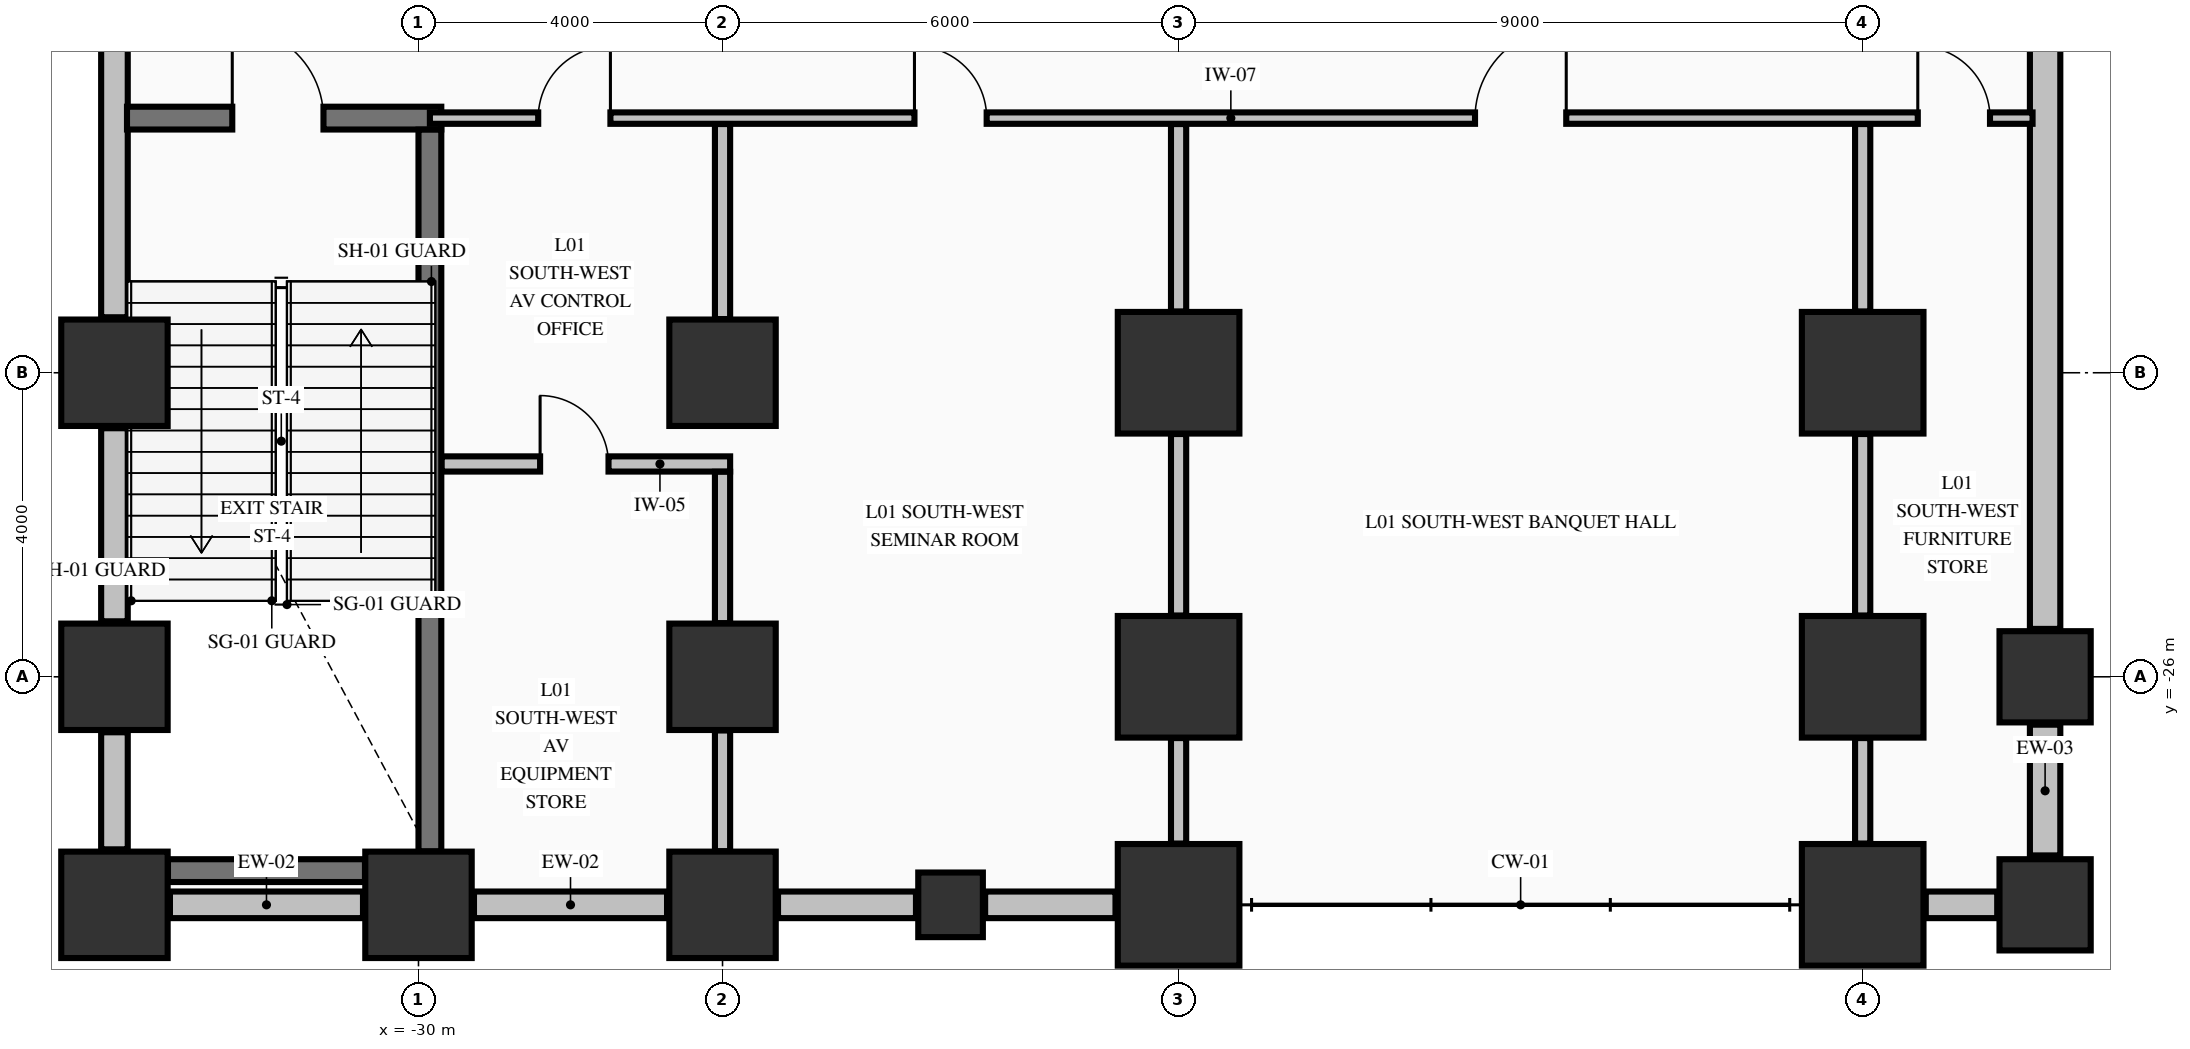
"""IFC4 building model, lengths in metres.
Left out: names, types, materials, properties, quantities, classifications, styles, units other than length and angle.
Written with IfcOpenShell. Run it as: python <this file> out.ifc"""

import sys

from ifc_helpers import new_model, si_unit, direction, frame, frame_2d, origin, origin_2d, place, context, subcontext, project, spatial, rectangle, extrude, element, fill, save


model = new_model("IFC4")
c1 = context("Model", 3, precision=1e-05, world=origin(), true_north=direction((0.0, 1.0)))
c2 = subcontext(c1, "Body", "Model", "MODEL_VIEW")
j1 = project(units=[si_unit("LENGTHUNIT", "METRE"), si_unit("PLANEANGLEUNIT", "RADIAN")], contexts=[c1])
p1 = place(None, origin())
s1 = spatial("IfcSite", under=j1, at=p1, CompositionType="ELEMENT")
p2 = place(p1, origin())
s2 = spatial("IfcBuilding", under=s1, at=p2, CompositionType="ELEMENT")
p3 = place(p2, frame((0.0, 0.0, 5.44)))
s3 = spatial("IfcBuildingStorey", under=s2, at=p3, CompositionType="ELEMENT", Elevation=5.44)
for number, where, z_axis, x_axis in (
    (1, (-34.0, -29.0, 0.0), (0.0, 0.0, 1.0), (1.0, 0.0, 0.0)),
    (2, (-34.0, -26.0, 0.0), (0.0, 0.0, 1.0), (1.0, 0.0, 0.0)),
    (3, (-34.0, -22.0, 0.0), (0.0, 0.0, 1.0), (1.0, 0.0, 0.0)),
    (4, (-30.0, -29.0, 0.0), (0.0, 0.0, 1.0), (1.0, 0.0, 0.0)),
    (5, (-26.0, -29.0, 0.0), (0.0, 0.0, 1.0), (1.0, 0.0, 0.0)),
    (6, (-26.0, -26.0, 0.0), (0.0, 0.0, 1.0), (1.0, 0.0, 0.0)),
    (7, (-26.0, -22.0, 0.0), (0.0, 0.0, 1.0), (1.0, 0.0, 0.0)),
):
    element("IfcColumn", number, at=place(p3, frame(where, z_axis=z_axis, x_axis=x_axis)), inside=s3, PredefinedType="COLUMN", context=c2, shape_type="SweptSolid", body=[
        extrude(rectangle(XDim=1.4, YDim=1.4, at=origin_2d()), origin(), (0.0, 0.0, 1.0), 5.09),
    ])
for number, where, z_axis, x_axis in (
    (8, (-20.0, -29.0, 0.0), (0.0, 0.0, 1.0), (1.0, 0.0, 0.0)),
    (9, (-20.0, -26.0, 0.0), (0.0, 0.0, 1.0), (1.0, 0.0, 0.0)),
    (10, (-20.0, -22.0, 0.0), (0.0, 0.0, 1.0), (1.0, 0.0, 0.0)),
    (11, (-11.0, -29.0, 0.0), (0.0, 0.0, 1.0), (1.0, 0.0, 0.0)),
    (12, (-11.0, -26.0, 0.0), (0.0, 0.0, 1.0), (1.0, 0.0, 0.0)),
    (13, (-11.0, -22.0, 0.0), (0.0, 0.0, 1.0), (1.0, 0.0, 0.0)),
):
    element("IfcColumn", number, at=place(p3, frame(where, z_axis=z_axis, x_axis=x_axis)), inside=s3, PredefinedType="COLUMN", context=c2, shape_type="SweptSolid", body=[
        extrude(rectangle(XDim=1.6, YDim=1.6, at=origin_2d()), origin(), (0.0, 0.0, 1.0), 5.09),
    ])
for number, where, z_axis, x_axis in (
    (14, (-8.6, -29.0, 0.0), (0.0, 0.0, 1.0), (1.0, 0.0, 0.0)),
    (15, (-8.6, -26.0, 0.0), (0.0, 0.0, 1.0), (1.0, 0.0, 0.0)),
):
    element("IfcColumn", number, at=place(p3, frame(where, z_axis=z_axis, x_axis=x_axis)), inside=s3, PredefinedType="COLUMN", context=c2, shape_type="SweptSolid", body=[
        extrude(rectangle(XDim=1.2, YDim=1.2, at=origin_2d()), origin(), (0.0, 0.0, 1.0), 5.09),
    ])
p4 = place(p3, frame((-23.0, -29.0, 0.0), z_axis=(0.0, 0.0, 1.0), x_axis=(1.0, 0.0, 0.0)))
e16 = element("IfcColumn", 16, at=p4, inside=s3, PredefinedType="PILASTER", context=c2, shape_type="SweptSolid", body=[
    extrude(rectangle(XDim=0.85, YDim=0.85, at=origin_2d()), origin(), (0.0, 0.0, 1.0), 5.09),
])
for number, where, z_axis, x_axis in (
    (17, (-33.27, -29.0, 0.0), (0.0, 0.0, 1.0), (1.0, 0.0, 0.0)),
    (18, (-29.27, -29.0, 0.0), (0.0, 0.0, 1.0), (1.0, 0.0, 0.0)),
):
    element("IfcWall", number, at=place(p3, frame(where, z_axis=z_axis, x_axis=x_axis)), inside=s3, PredefinedType="STANDARD", context=c2, shape_type="SweptSolid", body=[
        extrude(rectangle(XDim=2.54, YDim=0.35, at=frame_2d((1.27, 0.0))), origin(), (0.0, 0.0, 1.0), 4.482),
    ])
p5 = place(p3, frame((-25.27, -29.0, 0.0), z_axis=(0.0, 0.0, 1.0), x_axis=(1.0, 0.0, 0.0)))
e19 = element("IfcWall", 19, at=p5, inside=s3, PredefinedType="STANDARD", context=c2, shape_type="SweptSolid", body=[
    extrude(rectangle(XDim=1.815, YDim=0.35, at=frame_2d((0.907, 0.0))), origin(), (0.0, 0.0, 1.0), 4.482),
])
p6 = place(p3, frame((-22.545, -29.0, 0.0), z_axis=(0.0, 0.0, 1.0), x_axis=(1.0, 0.0, 0.0)))
e20 = element("IfcWall", 20, at=p6, inside=s3, PredefinedType="STANDARD", context=c2, shape_type="SweptSolid", body=[
    extrude(rectangle(XDim=1.715, YDim=0.35, at=frame_2d((0.857, 0.0))), origin(), (0.0, 0.0, 1.0), 4.482),
])
p7 = place(p3, frame((-10.17, -29.0, 0.0), z_axis=(0.0, 0.0, 1.0), x_axis=(1.0, 0.0, 0.0)))
e21 = element("IfcWall", 21, at=p7, inside=s3, PredefinedType="STANDARD", context=c2, shape_type="SweptSolid", body=[
    extrude(rectangle(XDim=0.94, YDim=0.35, at=frame_2d((0.47, 0.0))), origin(), (0.0, 0.0, 1.0), 4.482),
])
p8 = place(p3, frame((-34.0, -28.27, 0.0), z_axis=(0.0, 0.0, 1.0), x_axis=(0.0, 1.0, 0.0)))
e22 = element("IfcWall", 22, at=p8, inside=s3, PredefinedType="STANDARD", context=c2, shape_type="SweptSolid", body=[
    extrude(rectangle(XDim=1.54, YDim=0.35, at=frame_2d((0.77, 0.0))), origin(), (0.0, 0.0, 1.0), 5.09),
])
p9 = place(p3, frame((-34.0, -25.27, 0.0), z_axis=(0.0, 0.0, 1.0), x_axis=(0.0, 1.0, 0.0)))
e23 = element("IfcWall", 23, at=p9, inside=s3, PredefinedType="STANDARD", context=c2, shape_type="SweptSolid", body=[
    extrude(rectangle(XDim=2.54, YDim=0.35, at=frame_2d((1.27, 0.0))), origin(), (0.0, 0.0, 1.0), 5.09),
])
p10 = place(p3, frame((-34.0, -21.27, 0.0), z_axis=(0.0, 0.0, 1.0), x_axis=(0.0, 1.0, 0.0)))
e24 = element("IfcWall", 24, at=p10, inside=s3, PredefinedType="STANDARD", context=c2, shape_type="SweptSolid", body=[
    extrude(rectangle(XDim=4.54, YDim=0.35, at=frame_2d((2.27, 0.0))), origin(), (0.0, 0.0, 1.0), 5.09),
])
p11 = place(p3, frame((-8.6, -28.35, 0.0), z_axis=(0.0, 0.0, 1.0), x_axis=(0.0, 1.0, 0.0)))
e25 = element("IfcWall", 25, at=p11, inside=s3, PredefinedType="STANDARD", context=c2, shape_type="SweptSolid", body=[
    extrude(rectangle(XDim=1.72, YDim=0.4, at=frame_2d((0.86, 0.0))), origin(), (0.0, 0.0, 1.0), 4.132),
])
p12 = place(p3, frame((-8.6, -25.37, 0.0), z_axis=(0.0, 0.0, 1.0), x_axis=(0.0, 1.0, 0.0)))
e26 = element("IfcWall", 26, at=p12, inside=s3, PredefinedType="STANDARD", context=c2, shape_type="SweptSolid", body=[
    extrude(rectangle(XDim=24.72, YDim=0.4, at=frame_2d((12.36, 0.0))), origin(), (0.0, 0.0, 1.0), 4.132),
])
p13 = place(p3, frame((-33.296, -28.55, 0.0), z_axis=(0.0, 0.0, 1.0), x_axis=(1.0, 0.0, 0.0)))
e27 = element("IfcWall", 27, at=p13, inside=s3, PredefinedType="SHEAR", context=c2, shape_type="SweptSolid", body=[
    extrude(rectangle(XDim=2.592, YDim=0.3, at=frame_2d((1.296, 0.0))), origin(), (0.0, 0.0, 1.0), 5.09),
])
p14 = place(p3, frame((-33.835, -18.65, 0.0), z_axis=(0.0, 0.0, 1.0), x_axis=(1.0, 0.0, 0.0)))
e28 = element("IfcWall", 28, at=p14, inside=s3, PredefinedType="SHEAR", context=c2, shape_type="SweptSolid", body=[
    extrude(rectangle(XDim=4.135, YDim=0.3, at=frame_2d((2.067, 0.0))), origin(), (0.0, 0.0, 1.0), 5.09),
])
p15 = place(p14, frame((1.385, 0.0, 0.0)))
e29 = element("IfcOpeningElement", 29, at=p15, cuts=e28, PredefinedType="OPENING", context=c2, shape_type="SweptSolid", body=[
    extrude(rectangle(XDim=1.2, YDim=2.15, at=frame_2d((0.6, 1.075))), frame((0.0, 0.16, 0.0), z_axis=(0.0, -1.0, 0.0), x_axis=(1.0, 0.0, 0.0)), (0.0, 0.0, 1.0), 0.32),
])
p16 = place(p3, frame((-29.697, -23.2, 0.0), z_axis=(0.0, 0.0, 1.0), x_axis=(1.0, 0.0, 0.0)))
e30 = element("IfcWall", 30, at=p16, inside=s3, PredefinedType="PARTITIONING", context=c2, shape_type="SweptSolid", body=[
    extrude(rectangle(XDim=3.797, YDim=0.2, at=frame_2d((1.898, 0.0))), origin(), (0.0, 0.0, 1.0), 5.09),
])
p17 = place(p16, frame((1.297, 0.0, 0.0)))
e31 = element("IfcOpeningElement", 31, at=p17, cuts=e30, PredefinedType="OPENING", context=c2, shape_type="SweptSolid", body=[
    extrude(rectangle(XDim=0.9, YDim=2.15, at=frame_2d((0.45, 1.075))), frame((0.0, 0.11, 0.0), z_axis=(0.0, -1.0, 0.0), x_axis=(1.0, 0.0, 0.0)), (0.0, 0.0, 1.0), 0.22),
])
p18 = place(p3, frame((-29.85, -18.65, 0.0), z_axis=(0.0, 0.0, 1.0), x_axis=(1.0, 0.0, 0.0)))
e32 = element("IfcWall", 32, at=p18, inside=s3, PredefinedType="PARTITIONING", context=c2, shape_type="SweptSolid", body=[
    extrude(rectangle(XDim=21.085, YDim=0.15, at=frame_2d((10.542, 0.0))), origin(), (0.0, 0.0, 1.0), 5.09),
])
p19 = place(p18, frame((1.425, 0.0, 0.0)))
e33 = element("IfcOpeningElement", 33, at=p19, cuts=e32, PredefinedType="OPENING", context=c2, shape_type="SweptSolid", body=[
    extrude(rectangle(XDim=0.95, YDim=2.15, at=frame_2d((0.475, 1.075))), frame((0.0, 0.085, 0.0), z_axis=(0.0, -1.0, 0.0), x_axis=(1.0, 0.0, 0.0)), (0.0, 0.0, 1.0), 0.17),
])
p20 = place(p18, frame((6.375, 0.0, 0.0)))
e34 = element("IfcOpeningElement", 34, at=p20, cuts=e32, PredefinedType="OPENING", context=c2, shape_type="SweptSolid", body=[
    extrude(rectangle(XDim=0.95, YDim=2.15, at=frame_2d((0.475, 1.075))), frame((0.0, 0.085, 0.0), z_axis=(0.0, -1.0, 0.0), x_axis=(1.0, 0.0, 0.0)), (0.0, 0.0, 1.0), 0.17),
])
p21 = place(p18, frame((13.75, 0.0, 0.0)))
e35 = element("IfcOpeningElement", 35, at=p21, cuts=e32, PredefinedType="OPENING", context=c2, shape_type="SweptSolid", body=[
    extrude(rectangle(XDim=1.2, YDim=2.15, at=frame_2d((0.6, 1.075))), frame((0.0, 0.085, 0.0), z_axis=(0.0, -1.0, 0.0), x_axis=(1.0, 0.0, 0.0)), (0.0, 0.0, 1.0), 0.17),
])
p22 = place(p18, frame((19.575, 0.0, 0.0)))
e36 = element("IfcOpeningElement", 36, at=p22, cuts=e32, PredefinedType="OPENING", context=c2, shape_type="SweptSolid", body=[
    extrude(rectangle(XDim=0.95, YDim=2.15, at=frame_2d((0.475, 1.075))), frame((0.0, 0.085, 0.0), z_axis=(0.0, -1.0, 0.0), x_axis=(1.0, 0.0, 0.0)), (0.0, 0.0, 1.0), 0.17),
])
p23 = place(p3, frame((-29.85, -28.296, 0.0), z_axis=(0.0, 0.0, 1.0), x_axis=(0.0, 1.0, 0.0)))
e37 = element("IfcWall", 37, at=p23, inside=s3, PredefinedType="SHEAR", context=c2, shape_type="SweptSolid", body=[
    extrude(rectangle(XDim=9.494, YDim=0.3, at=frame_2d((4.747, 0.0))), origin(), (0.0, 0.0, 1.0), 5.09),
])
p24 = place(p3, frame((-26.0, -28.294, 0.0), z_axis=(0.0, 0.0, 1.0), x_axis=(0.0, 1.0, 0.0)))
e38 = element("IfcWall", 38, at=p24, inside=s3, PredefinedType="PARTITIONING", context=c2, shape_type="SweptSolid", body=[
    extrude(rectangle(XDim=1.588, YDim=0.2, at=frame_2d((0.794, 0.0))), origin(), (0.0, 0.0, 1.0), 4.132),
])
p25 = place(p3, frame((-26.0, -25.294, 0.0), z_axis=(0.0, 0.0, 1.0), x_axis=(0.0, 1.0, 0.0)))
e39 = element("IfcWall", 39, at=p25, inside=s3, PredefinedType="PARTITIONING", context=c2, shape_type="SweptSolid", body=[
    extrude(rectangle(XDim=1.991, YDim=0.2, at=frame_2d((0.996, 0.0))), origin(), (0.0, 0.0, 1.0), 4.132),
])
p26 = place(p3, frame((-26.0, -21.294, 0.0), z_axis=(0.0, 0.0, 1.0), x_axis=(0.0, 1.0, 0.0)))
e40 = element("IfcWall", 40, at=p26, inside=s3, PredefinedType="PARTITIONING", context=c2, shape_type="SweptSolid", body=[
    extrude(rectangle(XDim=2.566, YDim=0.2, at=frame_2d((1.283, 0.0))), origin(), (0.0, 0.0, 1.0), 4.132),
])
p27 = place(p3, frame((-20.0, -28.194, 0.0), z_axis=(0.0, 0.0, 1.0), x_axis=(0.0, 1.0, 0.0)))
e41 = element("IfcWall", 41, at=p27, inside=s3, PredefinedType="PARTITIONING", context=c2, shape_type="SweptSolid", body=[
    extrude(rectangle(XDim=1.388, YDim=0.2, at=frame_2d((0.694, 0.0))), origin(), (0.0, 0.0, 1.0), 4.132),
])
p28 = place(p3, frame((-20.0, -25.194, 0.0), z_axis=(0.0, 0.0, 1.0), x_axis=(0.0, 1.0, 0.0)))
e42 = element("IfcWall", 42, at=p28, inside=s3, PredefinedType="PARTITIONING", context=c2, shape_type="SweptSolid", body=[
    extrude(rectangle(XDim=2.388, YDim=0.2, at=frame_2d((1.194, 0.0))), origin(), (0.0, 0.0, 1.0), 4.132),
])
p29 = place(p3, frame((-20.0, -21.194, 0.0), z_axis=(0.0, 0.0, 1.0), x_axis=(0.0, 1.0, 0.0)))
e43 = element("IfcWall", 43, at=p29, inside=s3, PredefinedType="PARTITIONING", context=c2, shape_type="SweptSolid", body=[
    extrude(rectangle(XDim=2.466, YDim=0.2, at=frame_2d((1.233, 0.0))), origin(), (0.0, 0.0, 1.0), 4.132),
])
p30 = place(p3, frame((-11.0, -28.194, 0.0), z_axis=(0.0, 0.0, 1.0), x_axis=(0.0, 1.0, 0.0)))
e44 = element("IfcWall", 44, at=p30, inside=s3, PredefinedType="PARTITIONING", context=c2, shape_type="SweptSolid", body=[
    extrude(rectangle(XDim=1.388, YDim=0.2, at=frame_2d((0.694, 0.0))), origin(), (0.0, 0.0, 1.0), 4.132),
])
p31 = place(p3, frame((-11.0, -25.194, 0.0), z_axis=(0.0, 0.0, 1.0), x_axis=(0.0, 1.0, 0.0)))
e45 = element("IfcWall", 45, at=p31, inside=s3, PredefinedType="PARTITIONING", context=c2, shape_type="SweptSolid", body=[
    extrude(rectangle(XDim=2.388, YDim=0.2, at=frame_2d((1.194, 0.0))), origin(), (0.0, 0.0, 1.0), 4.132),
])
p32 = place(p3, frame((-11.0, -21.194, 0.0), z_axis=(0.0, 0.0, 1.0), x_axis=(0.0, 1.0, 0.0)))
e46 = element("IfcWall", 46, at=p32, inside=s3, PredefinedType="PARTITIONING", context=c2, shape_type="SweptSolid", body=[
    extrude(rectangle(XDim=2.466, YDim=0.2, at=frame_2d((1.233, 0.0))), origin(), (0.0, 0.0, 1.0), 4.132),
])
p33 = place(p15, origin())
e47 = element("IfcDoor", 47, at=p33, inside=s3, OperationType="SINGLE_SWING_LEFT", PredefinedType="DOOR", context=c2, shape_type="SweptSolid", body=[
    extrude(rectangle(XDim=1.2, YDim=2.15, at=frame_2d((0.6, 1.075))), frame((0.0, 0.025, 0.0), z_axis=(0.0, -1.0, 0.0), x_axis=(1.0, 0.0, 0.0)), (0.0, 0.0, 1.0), 0.05),
])
fill(e29, e47)
p34 = place(p17, origin())
e48 = element("IfcDoor", 48, at=p34, inside=s3, OperationType="SINGLE_SWING_LEFT", PredefinedType="DOOR", context=c2, shape_type="SweptSolid", body=[
    extrude(rectangle(XDim=0.9, YDim=2.15, at=frame_2d((0.45, 1.075))), frame((0.0, 0.025, 0.0), z_axis=(0.0, -1.0, 0.0), x_axis=(1.0, 0.0, 0.0)), (0.0, 0.0, 1.0), 0.05),
])
fill(e31, e48)
p35 = place(p19, origin())
e49 = element("IfcDoor", 49, at=p35, inside=s3, OperationType="SINGLE_SWING_RIGHT", PredefinedType="DOOR", context=c2, shape_type="SweptSolid", body=[
    extrude(rectangle(XDim=0.95, YDim=2.15, at=frame_2d((0.475, 1.075))), frame((0.0, 0.025, 0.0), z_axis=(0.0, -1.0, 0.0), x_axis=(1.0, 0.0, 0.0)), (0.0, 0.0, 1.0), 0.05),
])
fill(e33, e49)
p36 = place(p20, origin())
e50 = element("IfcDoor", 50, at=p36, inside=s3, OperationType="SINGLE_SWING_LEFT", PredefinedType="DOOR", context=c2, shape_type="SweptSolid", body=[
    extrude(rectangle(XDim=0.95, YDim=2.15, at=frame_2d((0.475, 1.075))), frame((0.0, 0.025, 0.0), z_axis=(0.0, -1.0, 0.0), x_axis=(1.0, 0.0, 0.0)), (0.0, 0.0, 1.0), 0.05),
])
fill(e34, e50)
p37 = place(p21, origin())
e51 = element("IfcDoor", 51, at=p37, inside=s3, OperationType="SINGLE_SWING_RIGHT", PredefinedType="DOOR", context=c2, shape_type="SweptSolid", body=[
    extrude(rectangle(XDim=1.2, YDim=2.15, at=frame_2d((0.6, 1.075))), frame((0.0, 0.025, 0.0), z_axis=(0.0, -1.0, 0.0), x_axis=(1.0, 0.0, 0.0)), (0.0, 0.0, 1.0), 0.05),
])
fill(e35, e51)
p38 = place(p22, origin())
e52 = element("IfcDoor", 52, at=p38, inside=s3, OperationType="SINGLE_SWING_LEFT", PredefinedType="DOOR", context=c2, shape_type="SweptSolid", body=[
    extrude(rectangle(XDim=0.95, YDim=2.15, at=frame_2d((0.475, 1.075))), frame((0.0, 0.025, 0.0), z_axis=(0.0, -1.0, 0.0), x_axis=(1.0, 0.0, 0.0)), (0.0, 0.0, 1.0), 0.05),
])
fill(e36, e52)
save(model, sys.argv[1])
